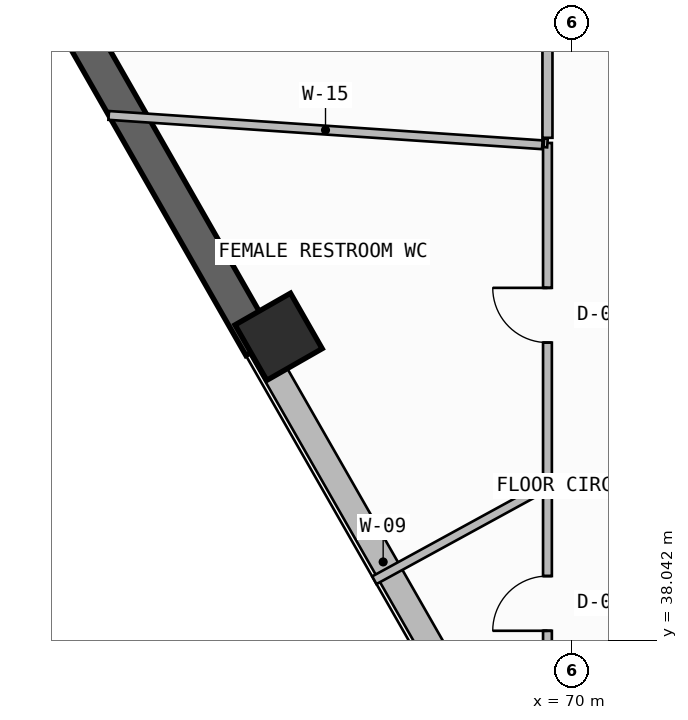
"""IFC4 building model, lengths in metres.
Left out: names, types, materials, properties, quantities, classifications, styles, units other than length and angle.
Written with IfcOpenShell. Run it as: python <this file> out.ifc"""

import sys

from ifc_helpers import new_model, si_unit, direction, frame, frame_2d, origin, origin_2d, place, context, subcontext, project, spatial, rectangle, extrude, element, fill, save


model = new_model("IFC4")
c1 = context("Model", 3, precision=1e-05, world=origin(), true_north=direction((0.0, 1.0)))
c2 = subcontext(c1, "Body", "Model", "MODEL_VIEW")
j1 = project(units=[si_unit("LENGTHUNIT", "METRE"), si_unit("PLANEANGLEUNIT", "RADIAN")], contexts=[c1])
p1 = place(None, origin())
s1 = spatial("IfcSite", under=j1, at=p1, CompositionType="ELEMENT")
p2 = place(p1, origin())
s2 = spatial("IfcBuilding", under=s1, at=p2, CompositionType="ELEMENT")
p3 = place(p2, frame((0.0, 0.0, 222.02)))
s3 = spatial("IfcBuildingStorey", under=s2, at=p3, CompositionType="ELEMENT", Elevation=222.02)
p4 = place(p3, frame((65.173, 43.035, 0.0), z_axis=(0.0, 0.0, 1.0), x_axis=(-0.496216503675, 0.868198814489, 0.0)))
e1 = element("IfcColumn", 1, at=p4, inside=s3, PredefinedType="COLUMN", context=c2, shape_type="SweptSolid", body=[
    extrude(rectangle(XDim=1.05, YDim=1.05, at=origin_2d()), origin(), (0.0, 0.0, 1.0), 3.52),
])
p5 = place(p3, frame((55.325, 59.57, -0.26), z_axis=(0.0, 0.0, 1.0), x_axis=(0.496211351597, -0.868201759124, 0.0)))
e2 = element("IfcWall", 2, at=p5, inside=s3, PredefinedType="SHEAR", context=c2, shape_type="SweptSolid", body=[
    extrude(rectangle(XDim=19.243, YDim=0.55, at=frame_2d((9.622, 0.0))), origin(), (0.0, 0.0, 1.0), 3.52),
])
p6 = place(p5, frame((7.757, 0.0, 1.1)))
e3 = element("IfcOpeningElement", 3, at=p6, cuts=e2, PredefinedType="OPENING", context=c2, shape_type="SweptSolid", body=[
    extrude(rectangle(XDim=2.4, YDim=1.2, at=frame_2d((1.2, 0.6))), frame((0.0, 0.285, 0.0), z_axis=(0.0, -1.0, 0.0), x_axis=(1.0, 0.0, 0.0)), (0.0, 0.0, 1.0), 0.57),
])
p7 = place(p3, frame((64.874, 42.864, 0.0), z_axis=(0.0, 0.0, 1.0), x_axis=(0.49622043329, -0.868196568517, 0.0)))
e4 = element("IfcWall", 4, at=p7, inside=s3, PredefinedType="SOLIDWALL", context=c2, shape_type="SweptSolid", body=[
    extrude(rectangle(XDim=12.582, YDim=0.42, at=frame_2d((6.291, 0.0))), origin(), (0.0, 0.0, 1.0), 2.645),
])
p8 = place(p7, frame((8.136, 0.0, 1.1)))
e5 = element("IfcOpeningElement", 5, at=p8, cuts=e4, PredefinedType="OPENING", context=c2, shape_type="SweptSolid", body=[
    extrude(rectangle(XDim=2.4, YDim=1.2, at=frame_2d((1.2, 0.6))), frame((0.0, 0.22, 0.0), z_axis=(0.0, -1.0, 0.0), x_axis=(1.0, 0.0, 0.0)), (0.0, 0.0, 1.0), 0.44),
])
p9 = place(p3, frame((69.594, 46.222, 0.0), z_axis=(0.0, 0.0, 1.0), x_axis=(0.0, -1.0, 0.0)))
e6 = element("IfcWall", 6, at=p9, inside=s3, PredefinedType="PARTITIONING", context=c2, shape_type="SweptSolid", body=[
    extrude(rectangle(XDim=5.666, YDim=0.145, at=frame_2d((2.833, 0.0))), origin(), (0.0, 0.0, 1.0), 3.26),
])
p10 = place(p9, frame((2.383, 0.0, 0.0)))
e7 = element("IfcOpeningElement", 7, at=p10, cuts=e6, PredefinedType="OPENING", context=c2, shape_type="SweptSolid", body=[
    extrude(rectangle(XDim=0.9, YDim=2.1, at=frame_2d((0.45, 1.05))), frame((0.0, 0.083, 0.0), z_axis=(0.0, -1.0, 0.0), x_axis=(1.0, 0.0, 0.0)), (0.0, 0.0, 1.0), 0.165),
])
p11 = place(p3, frame((69.594, 40.556, 0.0), z_axis=(0.0, 0.0, 1.0), x_axis=(-0.875838256619, -0.482604753647, 0.0)))
e8 = element("IfcWall", 8, at=p11, inside=s3, PredefinedType="PARTITIONING", context=c2, shape_type="SweptSolid", body=[
    extrude(rectangle(XDim=0.068, YDim=0.145, at=frame_2d((0.034, 0.0))), origin(), (0.0, 0.0, 1.0), 3.26),
])
p12 = place(p3, frame((69.535, 46.226, 0.0), z_axis=(0.0, 0.0, 1.0), x_axis=(0.997601327848, -0.069221316626, 0.0)))
e9 = element("IfcWall", 9, at=p12, inside=s3, PredefinedType="PARTITIONING", context=c2, shape_type="SweptSolid", body=[
    extrude(rectangle(XDim=0.06, YDim=0.145, at=frame_2d((0.03, 0.0))), origin(), (0.0, 0.0, 1.0), 3.26),
])
p13 = place(p3, frame((69.521, 40.548, 0.0), z_axis=(0.0, 0.0, 1.0), x_axis=(-0.877304579838, -0.479934031087, 0.0)))
e10 = element("IfcWall", 10, at=p13, inside=s3, PredefinedType="PARTITIONING", context=c2, shape_type="SweptSolid", body=[
    extrude(rectangle(XDim=3.161, YDim=0.145, at=frame_2d((1.581, 0.0))), origin(), (0.0, 0.0, 1.0), 3.26),
])
p14 = place(p3, frame((62.379, 46.675, 0.0), z_axis=(0.0, 0.0, 1.0), x_axis=(0.997714934638, -0.067564111771, 0.0)))
e11 = element("IfcWall", 11, at=p14, inside=s3, PredefinedType="PARTITIONING", context=c2, shape_type="SweptSolid", body=[
    extrude(rectangle(XDim=7.147, YDim=0.145, at=frame_2d((3.574, 0.0))), origin(), (0.0, 0.0, 1.0), 2.645),
])
p15 = place(p3, frame((69.594, 40.459, 0.0), z_axis=(0.0, 0.0, 1.0), x_axis=(0.0, -1.0, 0.0)))
e12 = element("IfcWall", 12, at=p15, inside=s3, PredefinedType="PARTITIONING", context=c2, shape_type="SweptSolid", body=[
    extrude(rectangle(XDim=3.084, YDim=0.145, at=frame_2d((1.542, 0.0))), origin(), (0.0, 0.0, 1.0), 3.26),
])
p16 = place(p15, frame((1.36, 0.0, 0.0)))
e13 = element("IfcOpeningElement", 13, at=p16, cuts=e12, PredefinedType="OPENING", context=c2, shape_type="SweptSolid", body=[
    extrude(rectangle(XDim=0.9, YDim=2.1, at=frame_2d((0.45, 1.05))), frame((0.0, 0.083, 0.0), z_axis=(0.0, -1.0, 0.0), x_axis=(1.0, 0.0, 0.0)), (0.0, 0.0, 1.0), 0.165),
])
p17 = place(p3, frame((69.594, 52.439, 0.0), z_axis=(0.0, 0.0, 1.0), x_axis=(0.0, -1.0, 0.0)))
e14 = element("IfcWall", 14, at=p17, inside=s3, PredefinedType="PARTITIONING", context=c2, shape_type="SweptSolid", body=[
    extrude(rectangle(XDim=6.132, YDim=0.165, at=frame_2d((3.066, 0.0))), origin(), (0.0, 0.0, 1.0), 2.745),
])
p18 = place(p17, frame((2.566, 0.0, 0.0)))
e15 = element("IfcOpeningElement", 15, at=p18, cuts=e14, PredefinedType="OPENING", context=c2, shape_type="SweptSolid", body=[
    extrude(rectangle(XDim=1.0, YDim=2.2, at=frame_2d((0.5, 1.1))), frame((0.0, 0.093, 0.0), z_axis=(0.0, -1.0, 0.0), x_axis=(1.0, 0.0, 0.0)), (0.0, 0.0, 1.0), 0.185),
])
p19 = place(p10, frame((0.9, 0.0, 0.0), z_axis=(0.0, 0.0, 1.0), x_axis=(-1.0, 0.0, 0.0)))
e16 = element("IfcDoor", 16, at=p19, inside=s3, OperationType="SINGLE_SWING_RIGHT", PredefinedType="DOOR", context=c2, shape_type="SweptSolid", body=[
    extrude(rectangle(XDim=0.9, YDim=2.1, at=frame_2d((0.45, 1.05))), frame((0.0, 0.025, 0.0), z_axis=(0.0, -1.0, 0.0), x_axis=(1.0, 0.0, 0.0)), (0.0, 0.0, 1.0), 0.05),
])
fill(e7, e16)
p20 = place(p16, frame((0.9, 0.0, 0.0), z_axis=(0.0, 0.0, 1.0), x_axis=(-1.0, 0.0, 0.0)))
e17 = element("IfcDoor", 17, at=p20, inside=s3, OperationType="SINGLE_SWING_LEFT", PredefinedType="DOOR", context=c2, shape_type="SweptSolid", body=[
    extrude(rectangle(XDim=0.9, YDim=2.1, at=frame_2d((0.45, 1.05))), frame((0.0, 0.025, 0.0), z_axis=(0.0, -1.0, 0.0), x_axis=(1.0, 0.0, 0.0)), (0.0, 0.0, 1.0), 0.05),
])
fill(e13, e17)
save(model, sys.argv[1])
